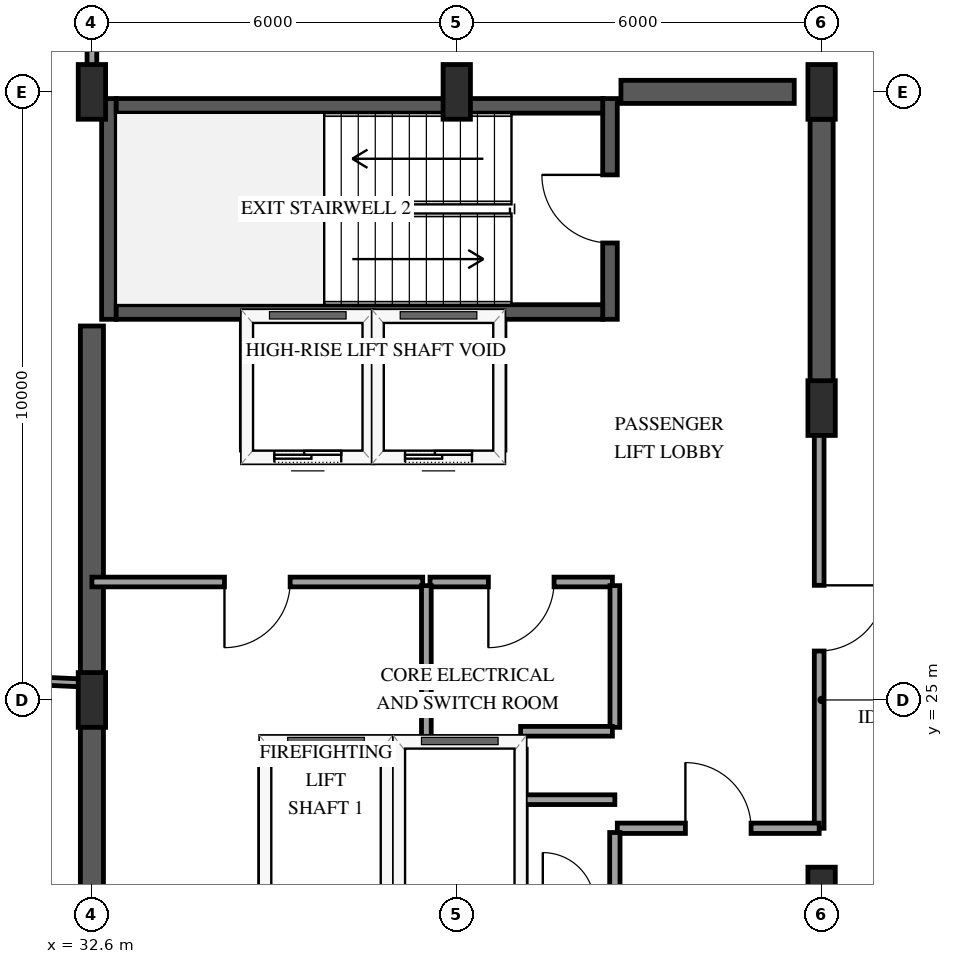
"""IFC4 building model, lengths in metres.
Left out: names, types, materials, properties, quantities, classifications, styles, units other than length and angle.
Written with IfcOpenShell. Run it as: python <this file> out.ifc"""

import sys

from ifc_helpers import new_model, si_unit, direction, frame, frame_2d, origin, origin_2d, place, context, subcontext, project, spatial, rectangle, extrude, element, fill, save


model = new_model("IFC4")
c1 = context("Model", 3, precision=1e-05, world=origin(), true_north=direction((0.0, 1.0)))
c2 = subcontext(c1, "Body", "Model", "MODEL_VIEW")
j1 = project(units=[si_unit("LENGTHUNIT", "METRE"), si_unit("PLANEANGLEUNIT", "RADIAN")], contexts=[c1])
p1 = place(None, origin())
s1 = spatial("IfcSite", under=j1, at=p1, CompositionType="ELEMENT")
p2 = place(p1, origin())
s2 = spatial("IfcBuilding", under=s1, at=p2, CompositionType="ELEMENT")
p3 = place(p2, frame((0.0, 0.0, 301.45)))
s3 = spatial("IfcBuildingStorey", under=s2, at=p3, CompositionType="ELEMENT", Elevation=301.45)
p4 = place(p3, frame((32.88, 31.26, 0.0), z_axis=(0.0, 0.0, 1.0), x_axis=(0.0, 1.0, 0.0)))
e1 = element("IfcWall", 1, at=p4, inside=s3, PredefinedType="SHEAR", context=c2, shape_type="SweptSolid", body=[
    extrude(rectangle(XDim=3.63, YDim=0.24, at=frame_2d((1.815, 0.0))), origin(), (0.0, 0.0, 1.0), 4.2),
])
p5 = place(p3, frame((41.12, 31.26, 0.0), z_axis=(0.0, 0.0, 1.0), x_axis=(0.0, 1.0, 0.0)))
e2 = element("IfcWall", 2, at=p5, inside=s3, PredefinedType="SHEAR", context=c2, shape_type="SweptSolid", body=[
    extrude(rectangle(XDim=3.63, YDim=0.24, at=frame_2d((1.815, 0.0))), origin(), (0.0, 0.0, 1.0), 4.2),
])
p6 = place(p5, frame((1.255, 0.0, 0.0)))
e3 = element("IfcOpeningElement", 3, at=p6, cuts=e2, PredefinedType="OPENING", context=c2, shape_type="SweptSolid", body=[
    extrude(rectangle(XDim=1.12, YDim=2.15, at=frame_2d((0.56, 1.075))), frame((0.0, 0.13, 0.0), z_axis=(0.0, -1.0, 0.0), x_axis=(1.0, 0.0, 0.0)), (0.0, 0.0, 1.0), 0.26),
])
for number, where, z_axis, x_axis in (
    (4, (33.0, 31.38, 0.0), (0.0, 0.0, 1.0), (1.0, 0.0, 0.0)),
    (5, (33.0, 34.77, 0.0), (0.0, 0.0, 1.0), (1.0, 0.0, 0.0)),
):
    element("IfcWall", number, at=place(p3, frame(where, z_axis=z_axis, x_axis=x_axis)), inside=s3, PredefinedType="SHEAR", context=c2, shape_type="SweptSolid", body=[
        extrude(rectangle(XDim=8.0, YDim=0.24, at=frame_2d((4.0, 0.0))), origin(), (0.0, 0.0, 1.0), 4.2),
    ])
p7 = place(p3, frame((32.6, 18.85, 0.0), z_axis=(0.0, 0.0, 1.0), x_axis=(0.0, 1.0, 0.0)))
e6 = element("IfcWall", 6, at=p7, inside=s3, PredefinedType="SHEAR", context=c2, shape_type="SweptSolid", body=[
    extrude(rectangle(XDim=12.3, YDim=0.38, at=frame_2d((6.15, 0.0))), origin(), (0.0, 0.0, 1.0), 4.2),
])
p8 = place(p3, frame((41.3, 35.0, 0.0), z_axis=(0.0, 0.0, 1.0), x_axis=(1.0, 0.0, 0.0)))
e7 = element("IfcWall", 7, at=p8, inside=s3, PredefinedType="SHEAR", context=c2, shape_type="SweptSolid", body=[
    extrude(rectangle(XDim=2.85, YDim=0.38, at=frame_2d((1.425, 0.0))), origin(), (0.0, 0.0, 1.0), 4.2),
])
p9 = place(p3, frame((44.6, 29.8, 0.0), z_axis=(0.0, 0.0, 1.0), x_axis=(0.0, 1.0, 0.0)))
e8 = element("IfcWall", 8, at=p9, inside=s3, PredefinedType="SHEAR", context=c2, shape_type="SweptSolid", body=[
    extrude(rectangle(XDim=4.75, YDim=0.38, at=frame_2d((2.375, 0.0))), origin(), (0.0, 0.0, 1.0), 4.2),
])
for number, where, z_axis, x_axis in (
    (9, (32.6, 25.0, 0.0), (0.0, 0.0, 1.0), (1.0, 0.0, 0.0)),
    (10, (32.6, 35.0, 0.0), (0.0, 0.0, 1.0), (1.0, 0.0, 0.0)),
    (11, (38.6, 35.0, 0.0), (0.0, 0.0, 1.0), (1.0, 0.0, 0.0)),
    (12, (44.6, 21.8, 0.0), (0.0, 0.0, 1.0), (1.0, 0.0, 0.0)),
    (13, (44.6, 29.8, 0.0), (0.0, 0.0, 1.0), (1.0, 0.0, 0.0)),
    (14, (44.6, 35.0, 0.0), (0.0, 0.0, 1.0), (1.0, 0.0, 0.0)),
):
    element("IfcColumn", number, at=place(p3, frame(where, z_axis=z_axis, x_axis=x_axis)), inside=s3, PredefinedType="PILASTER", context=c2, shape_type="SweptSolid", body=[
        extrude(rectangle(XDim=0.45, YDim=0.9, at=origin_2d()), origin(), (0.0, 0.0, 1.0), 4.2),
    ])
p10 = place(p3, frame((35.45, 24.3, 0.0), z_axis=(0.0, 0.0, 1.0), x_axis=(1.0, 0.0, 0.0)))
e15 = element("IfcWall", 15, at=p10, inside=s3, PredefinedType="SOLIDWALL", context=c2, shape_type="SweptSolid", body=[
    extrude(rectangle(XDim=2.0, YDim=0.185, at=frame_2d((1.0, 0.0))), origin(), (0.0, 0.0, 1.0), 3.895),
])
for number, where, z_axis, x_axis in (
    (16, (35.45, 21.81, 0.0), (0.0, 0.0, 1.0), (0.0, 1.0, 0.0)),
    (17, (37.45, 21.81, 0.0), (0.0, 0.0, 1.0), (0.0, 1.0, 0.0)),
):
    element("IfcWall", number, at=place(p3, frame(where, z_axis=z_axis, x_axis=x_axis)), inside=s3, PredefinedType="SOLIDWALL", context=c2, shape_type="SweptSolid", body=[
        extrude(rectangle(XDim=2.38, YDim=0.185, at=frame_2d((1.19, 0.0))), origin(), (0.0, 0.0, 1.0), 3.895),
    ])
p11 = place(p3, frame((37.65, 24.3, 0.0), z_axis=(0.0, 0.0, 1.0), x_axis=(1.0, 0.0, 0.0)))
e18 = element("IfcWall", 18, at=p11, inside=s3, PredefinedType="SOLIDWALL", context=c2, shape_type="SweptSolid", body=[
    extrude(rectangle(XDim=2.0, YDim=0.185, at=frame_2d((1.0, 0.0))), origin(), (0.0, 0.0, 1.0), 3.895),
])
p12 = place(p3, frame((39.65, 21.81, 0.0), z_axis=(0.0, 0.0, 1.0), x_axis=(0.0, 1.0, 0.0)))
e19 = element("IfcWall", 19, at=p12, inside=s3, PredefinedType="SOLIDWALL", context=c2, shape_type="SweptSolid", body=[
    extrude(rectangle(XDim=2.38, YDim=0.185, at=frame_2d((1.19, 0.0))), origin(), (0.0, 0.0, 1.0), 3.895),
])
p13 = place(p3, frame((35.15, 29.0, 0.0), z_axis=(0.0, 0.0, 1.0), x_axis=(1.0, 0.0, 0.0)))
e20 = element("IfcWall", 20, at=p13, inside=s3, PredefinedType="SOLIDWALL", context=c2, shape_type="SweptSolid", body=[
    extrude(rectangle(XDim=2.0, YDim=0.185, at=frame_2d((1.0, 0.0))), origin(), (0.0, 0.0, 1.0), 3.895),
])
p14 = place(p13, frame((0.45, 0.0, 0.0)))
e21 = element("IfcOpeningElement", 21, at=p14, cuts=e20, PredefinedType="OPENING", context=c2, shape_type="SweptSolid", body=[
    extrude(rectangle(XDim=1.1, YDim=2.15, at=frame_2d((0.55, 1.075))), frame((0.0, 0.103, 0.0), z_axis=(0.0, -1.0, 0.0), x_axis=(1.0, 0.0, 0.0)), (0.0, 0.0, 1.0), 0.205),
])
for number, where, z_axis, x_axis in (
    (22, (35.15, 29.11, 0.0), (0.0, 0.0, 1.0), (0.0, 1.0, 0.0)),
    (23, (37.15, 29.11, 0.0), (0.0, 0.0, 1.0), (0.0, 1.0, 0.0)),
):
    element("IfcWall", number, at=place(p3, frame(where, z_axis=z_axis, x_axis=x_axis)), inside=s3, PredefinedType="SOLIDWALL", context=c2, shape_type="SweptSolid", body=[
        extrude(rectangle(XDim=2.1, YDim=0.185, at=frame_2d((1.05, 0.0))), origin(), (0.0, 0.0, 1.0), 3.895),
    ])
p15 = place(p3, frame((37.3, 29.0, 0.0), z_axis=(0.0, 0.0, 1.0), x_axis=(1.0, 0.0, 0.0)))
e24 = element("IfcWall", 24, at=p15, inside=s3, PredefinedType="SOLIDWALL", context=c2, shape_type="SweptSolid", body=[
    extrude(rectangle(XDim=2.0, YDim=0.185, at=frame_2d((1.0, 0.0))), origin(), (0.0, 0.0, 1.0), 3.895),
])
p16 = place(p15, frame((0.45, 0.0, 0.0)))
e25 = element("IfcOpeningElement", 25, at=p16, cuts=e24, PredefinedType="OPENING", context=c2, shape_type="SweptSolid", body=[
    extrude(rectangle(XDim=1.1, YDim=2.15, at=frame_2d((0.55, 1.075))), frame((0.0, 0.103, 0.0), z_axis=(0.0, -1.0, 0.0), x_axis=(1.0, 0.0, 0.0)), (0.0, 0.0, 1.0), 0.205),
])
p17 = place(p3, frame((39.3, 29.11, 0.0), z_axis=(0.0, 0.0, 1.0), x_axis=(0.0, 1.0, 0.0)))
e26 = element("IfcWall", 26, at=p17, inside=s3, PredefinedType="SOLIDWALL", context=c2, shape_type="SweptSolid", body=[
    extrude(rectangle(XDim=2.1, YDim=0.185, at=frame_2d((1.05, 0.0))), origin(), (0.0, 0.0, 1.0), 3.895),
])
p18 = place(p3, frame((44.56, 29.8, 0.0), z_axis=(0.0, 0.0, 1.0), x_axis=(0.0, -1.0, 0.0)))
e27 = element("IfcWall", 27, at=p18, inside=s3, PredefinedType="PARTITIONING", context=c2, shape_type="SweptSolid", body=[
    extrude(rectangle(XDim=6.91, YDim=0.16, at=frame_2d((3.455, 0.0))), origin(), (0.0, 0.0, 1.0), 2.935),
])
p19 = place(p18, frame((2.915, 0.0, 0.0)))
e28 = element("IfcOpeningElement", 28, at=p19, cuts=e27, PredefinedType="OPENING", context=c2, shape_type="SweptSolid", body=[
    extrude(rectangle(XDim=1.08, YDim=2.15, at=frame_2d((0.54, 1.075))), frame((0.0, 0.09, 0.0), z_axis=(0.0, -1.0, 0.0), x_axis=(1.0, 0.0, 0.0)), (0.0, 0.0, 1.0), 0.18),
])
p20 = place(p3, frame((32.527, 25.276, 0.0), z_axis=(0.0, 0.0, 1.0), x_axis=(-0.99896311896, 0.045526771868, 0.0)))
e29 = element("IfcWall", 29, at=p20, inside=s3, PredefinedType="PARTITIONING", context=c2, shape_type="SweptSolid", body=[
    extrude(rectangle(XDim=6.88, YDim=0.13, at=frame_2d((3.44, 0.0))), origin(), (0.0, 0.0, 1.0), 3.19),
])
p21 = place(p3, frame((38.04, 26.94, 0.0), z_axis=(0.0, 0.0, 1.0), x_axis=(-1.0, 0.0, 0.0)))
e30 = element("IfcWall", 30, at=p21, inside=s3, PredefinedType="PARTITIONING", context=c2, shape_type="SweptSolid", body=[
    extrude(rectangle(XDim=5.44, YDim=0.16, at=frame_2d((2.72, 0.0))), origin(), (0.0, 0.0, 1.0), 3.895),
])
p22 = place(p21, frame((2.18, 0.0, 0.0)))
e31 = element("IfcOpeningElement", 31, at=p22, cuts=e30, PredefinedType="OPENING", context=c2, shape_type="SweptSolid", body=[
    extrude(rectangle(XDim=1.08, YDim=2.15, at=frame_2d((0.54, 1.075))), frame((0.0, 0.09, 0.0), z_axis=(0.0, -1.0, 0.0), x_axis=(1.0, 0.0, 0.0)), (0.0, 0.0, 1.0), 0.18),
])
p23 = place(p3, frame((41.24, 22.89, 0.0), z_axis=(0.0, 0.0, 1.0), x_axis=(1.0, 0.0, 0.0)))
e32 = element("IfcWall", 32, at=p23, inside=s3, PredefinedType="PARTITIONING", context=c2, shape_type="SweptSolid", body=[
    extrude(rectangle(XDim=3.32, YDim=0.17, at=frame_2d((1.66, 0.0))), origin(), (0.0, 0.0, 1.0), 3.895),
])
p24 = place(p23, frame((1.12, 0.0, 0.0)))
e33 = element("IfcOpeningElement", 33, at=p24, cuts=e32, PredefinedType="OPENING", context=c2, shape_type="SweptSolid", body=[
    extrude(rectangle(XDim=1.08, YDim=2.15, at=frame_2d((0.54, 1.075))), frame((0.0, 0.095, 0.0), z_axis=(0.0, -1.0, 0.0), x_axis=(1.0, 0.0, 0.0)), (0.0, 0.0, 1.0), 0.19),
])
p25 = place(p3, frame((41.16, 26.94, 0.0), z_axis=(0.0, 0.0, 1.0), x_axis=(-1.0, 0.0, 0.0)))
e34 = element("IfcWall", 34, at=p25, inside=s3, PredefinedType="PARTITIONING", context=c2, shape_type="SweptSolid", body=[
    extrude(rectangle(XDim=3.0, YDim=0.16, at=frame_2d((1.5, 0.0))), origin(), (0.0, 0.0, 1.0), 3.895),
])
p26 = place(p25, frame((0.96, 0.0, 0.0)))
e35 = element("IfcOpeningElement", 35, at=p26, cuts=e34, PredefinedType="OPENING", context=c2, shape_type="SweptSolid", body=[
    extrude(rectangle(XDim=1.08, YDim=2.15, at=frame_2d((0.54, 1.075))), frame((0.0, 0.09, 0.0), z_axis=(0.0, -1.0, 0.0), x_axis=(1.0, 0.0, 0.0)), (0.0, 0.0, 1.0), 0.18),
])
p27 = place(p3, frame((32.6, 35.12, 0.0), z_axis=(0.0, 0.0, 1.0), x_axis=(0.0, 1.0, 0.0)))
e36 = element("IfcWall", 36, at=p27, inside=s3, PredefinedType="PARTITIONING", context=c2, shape_type="SweptSolid", body=[
    extrude(rectangle(XDim=2.638, YDim=0.16, at=frame_2d((1.319, 0.0))), origin(), (0.0, 0.0, 1.0), 3.895),
])
p28 = place(p3, frame((38.1, 26.88, 0.0), z_axis=(0.0, 0.0, 1.0), x_axis=(0.0, -1.0, 0.0)))
e37 = element("IfcWall", 37, at=p28, inside=s3, PredefinedType="PARTITIONING", context=c2, shape_type="SweptSolid", body=[
    extrude(rectangle(XDim=2.58, YDim=0.16, at=frame_2d((1.29, 0.0))), origin(), (0.0, 0.0, 1.0), 3.895),
])
p29 = place(p3, frame((41.2, 24.55, 0.0), z_axis=(0.0, 0.0, 1.0), x_axis=(0.0, 1.0, 0.0)))
e38 = element("IfcWall", 38, at=p29, inside=s3, PredefinedType="PARTITIONING", context=c2, shape_type="SweptSolid", body=[
    extrude(rectangle(XDim=2.33, YDim=0.16, at=frame_2d((1.165, 0.0))), origin(), (0.0, 0.0, 1.0), 3.895),
])
p30 = place(p3, frame((39.65, 24.485, 0.0), z_axis=(0.0, 0.0, 1.0), x_axis=(1.0, 0.0, 0.0)))
e39 = element("IfcWall", 39, at=p30, inside=s3, PredefinedType="PARTITIONING", context=c2, shape_type="SweptSolid", body=[
    extrude(rectangle(XDim=1.51, YDim=0.16, at=frame_2d((0.755, 0.0))), origin(), (0.0, 0.0, 1.0), 3.895),
])
p31 = place(p3, frame((41.2, 21.7, 0.0), z_axis=(0.0, 0.0, 1.0), x_axis=(0.0, 1.0, 0.0)))
e40 = element("IfcWall", 40, at=p31, inside=s3, PredefinedType="PARTITIONING", context=c2, shape_type="SweptSolid", body=[
    extrude(rectangle(XDim=1.12, YDim=0.17, at=frame_2d((0.56, 0.0))), origin(), (0.0, 0.0, 1.0), 3.895),
])
p32 = place(p3, frame((41.2, 23.36, 0.0), z_axis=(0.0, 0.0, 1.0), x_axis=(-1.0, 0.0, 0.0)))
e41 = element("IfcWall", 41, at=p32, inside=s3, PredefinedType="PARTITIONING", context=c2, shape_type="SweptSolid", body=[
    extrude(rectangle(XDim=1.48, YDim=0.16, at=frame_2d((0.74, 0.0))), origin(), (0.0, 0.0, 1.0), 3.895),
])
p33 = place(p14, origin())
e42 = element("IfcDoor", 42, at=p33, inside=s3, OperationType="SLIDING_TO_LEFT", PredefinedType="DOOR", context=c2, shape_type="SweptSolid", body=[
    extrude(rectangle(XDim=1.1, YDim=2.15, at=frame_2d((0.55, 1.075))), frame((0.0, 0.025, 0.0), z_axis=(0.0, -1.0, 0.0), x_axis=(1.0, 0.0, 0.0)), (0.0, 0.0, 1.0), 0.05),
])
fill(e21, e42)
p34 = place(p16, origin())
e43 = element("IfcDoor", 43, at=p34, inside=s3, OperationType="SLIDING_TO_LEFT", PredefinedType="DOOR", context=c2, shape_type="SweptSolid", body=[
    extrude(rectangle(XDim=1.1, YDim=2.15, at=frame_2d((0.55, 1.075))), frame((0.0, 0.025, 0.0), z_axis=(0.0, -1.0, 0.0), x_axis=(1.0, 0.0, 0.0)), (0.0, 0.0, 1.0), 0.05),
])
fill(e25, e43)
p35 = place(p6, origin())
e44 = element("IfcDoor", 44, at=p35, inside=s3, OperationType="SINGLE_SWING_RIGHT", PredefinedType="DOOR", context=c2, shape_type="SweptSolid", body=[
    extrude(rectangle(XDim=1.12, YDim=2.15, at=frame_2d((0.56, 1.075))), frame((0.0, 0.025, 0.0), z_axis=(0.0, -1.0, 0.0), x_axis=(1.0, 0.0, 0.0)), (0.0, 0.0, 1.0), 0.05),
])
fill(e3, e44)
p36 = place(p19, origin())
e45 = element("IfcDoor", 45, at=p36, inside=s3, OperationType="SINGLE_SWING_LEFT", PredefinedType="DOOR", context=c2, shape_type="SweptSolid", body=[
    extrude(rectangle(XDim=1.08, YDim=2.15, at=frame_2d((0.54, 1.075))), frame((0.0, 0.025, 0.0), z_axis=(0.0, -1.0, 0.0), x_axis=(1.0, 0.0, 0.0)), (0.0, 0.0, 1.0), 0.05),
])
fill(e28, e45)
p37 = place(p22, origin())
e46 = element("IfcDoor", 46, at=p37, inside=s3, OperationType="SINGLE_SWING_RIGHT", PredefinedType="DOOR", context=c2, shape_type="SweptSolid", body=[
    extrude(rectangle(XDim=1.08, YDim=2.15, at=frame_2d((0.54, 1.075))), frame((0.0, 0.025, 0.0), z_axis=(0.0, -1.0, 0.0), x_axis=(1.0, 0.0, 0.0)), (0.0, 0.0, 1.0), 0.05),
])
fill(e31, e46)
p38 = place(p24, origin())
e47 = element("IfcDoor", 47, at=p38, inside=s3, OperationType="SINGLE_SWING_LEFT", PredefinedType="DOOR", context=c2, shape_type="SweptSolid", body=[
    extrude(rectangle(XDim=1.08, YDim=2.15, at=frame_2d((0.54, 1.075))), frame((0.0, 0.025, 0.0), z_axis=(0.0, -1.0, 0.0), x_axis=(1.0, 0.0, 0.0)), (0.0, 0.0, 1.0), 0.05),
])
fill(e33, e47)
p39 = place(p26, origin())
e48 = element("IfcDoor", 48, at=p39, inside=s3, OperationType="SINGLE_SWING_RIGHT", PredefinedType="DOOR", context=c2, shape_type="SweptSolid", body=[
    extrude(rectangle(XDim=1.08, YDim=2.15, at=frame_2d((0.54, 1.075))), frame((0.0, 0.025, 0.0), z_axis=(0.0, -1.0, 0.0), x_axis=(1.0, 0.0, 0.0)), (0.0, 0.0, 1.0), 0.05),
])
fill(e35, e48)
save(model, sys.argv[1])
